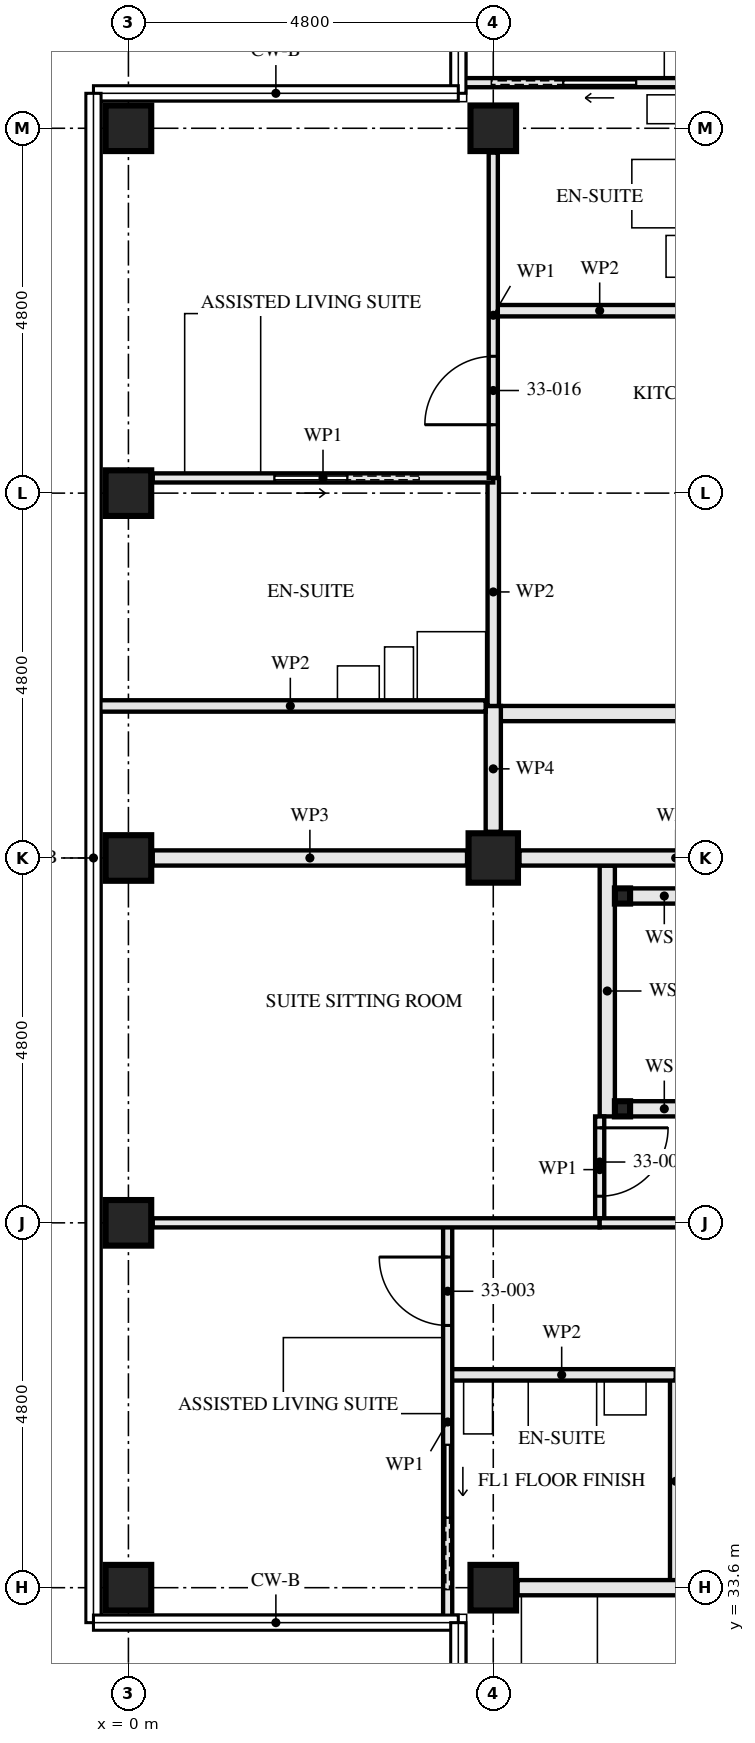
"""IFC4 building model, lengths in metres.
Left out: names, types, materials, properties, quantities, classifications, styles, units other than length and angle.
Written with IfcOpenShell. Run it as: python <this file> out.ifc"""

import sys

from ifc_helpers import new_model, si_unit, direction, frame, frame_2d, origin, origin_2d, place, context, subcontext, project, spatial, rectangle, hollow_rectangle, extrude, element, fill, save


model = new_model("IFC4")
c1 = context("Model", 3, precision=1e-05, world=origin(), true_north=direction((0.0, 1.0)))
c2 = subcontext(c1, "Body", "Model", "MODEL_VIEW")
j1 = project(units=[si_unit("LENGTHUNIT", "METRE"), si_unit("PLANEANGLEUNIT", "RADIAN")], contexts=[c1])
p1 = place(None, origin())
s1 = spatial("IfcSite", under=j1, at=p1, CompositionType="ELEMENT")
p2 = place(p1, origin())
s2 = spatial("IfcBuilding", under=s1, at=p2, CompositionType="ELEMENT")
p3 = place(p2, frame((0.0, 0.0, 122.5)))
s3 = spatial("IfcBuildingStorey", under=s2, at=p3, CompositionType="ELEMENT", Elevation=122.5)
for number, where, z_axis, x_axis in (
    (1, (0.0, 33.6, 0.0), (0.0, 0.0, 1.0), (0.0, 1.0, 0.0)),
    (2, (0.0, 38.4, 0.0), (0.0, 0.0, 1.0), (1.0, 0.0, 0.0)),
    (3, (0.0, 43.2, 0.0), (0.0, 0.0, 1.0), (0.0, 1.0, 0.0)),
    (4, (0.0, 48.0, 0.0), (0.0, 0.0, 1.0), (1.0, 0.0, 0.0)),
    (5, (0.0, 52.8, 0.0), (0.0, 0.0, 1.0), (0.0, 1.0, 0.0)),
    (6, (4.8, 33.6, 0.0), (0.0, 0.0, 1.0), (0.0, 1.0, 0.0)),
):
    element("IfcColumn", number, at=place(p3, frame(where, z_axis=z_axis, x_axis=x_axis)), inside=s3, PredefinedType="COLUMN", context=c2, shape_type="SweptSolid", body=[
        extrude(hollow_rectangle(XDim=0.6, YDim=0.6, WallThickness=0.08, at=origin_2d()), origin(), (0.0, 0.0, 1.0), 3.5),
    ])
p4 = place(p3, frame((4.8, 43.2, 0.0), z_axis=(0.0, 0.0, 1.0), x_axis=(0.0, 1.0, 0.0)))
e7 = element("IfcColumn", 7, at=p4, inside=s3, PredefinedType="COLUMN", context=c2, shape_type="SweptSolid", body=[
    extrude(hollow_rectangle(XDim=0.65, YDim=0.65, WallThickness=0.05, at=origin_2d()), origin(), (0.0, 0.0, 1.0), 3.5),
])
p5 = place(p3, frame((4.8, 52.8, 0.0), z_axis=(0.0, 0.0, 1.0), x_axis=(0.0, 1.0, 0.0)))
e8 = element("IfcColumn", 8, at=p5, inside=s3, PredefinedType="COLUMN", context=c2, shape_type="SweptSolid", body=[
    extrude(hollow_rectangle(XDim=0.6, YDim=0.6, WallThickness=0.08, at=origin_2d()), origin(), (0.0, 0.0, 1.0), 3.5),
])
for number, where, z_axis, x_axis in (
    (9, (6.5, 42.7, 0.0), (0.0, 0.0, 1.0), (1.0, 0.0, 0.0)),
    (10, (6.5, 39.9, 0.0), (0.0, 0.0, 1.0), (1.0, 0.0, 0.0)),
):
    element("IfcColumn", number, at=place(p3, frame(where, z_axis=z_axis, x_axis=x_axis)), inside=s3, PredefinedType="COLUMN", context=c2, shape_type="SweptSolid", body=[
        extrude(hollow_rectangle(XDim=0.2, YDim=0.2, WallThickness=0.008, at=origin_2d()), origin(), (0.0, 0.0, 1.0), 3.33),
    ])
for number, where, z_axis, x_axis in (
    (11, (6.6, 42.7, 0.0), (0.0, 0.0, 1.0), (1.0, 0.0, 0.0)),
    (12, (6.6, 39.9, 0.0), (0.0, 0.0, 1.0), (1.0, 0.0, 0.0)),
):
    element("IfcWall", number, at=place(p3, frame(where, z_axis=z_axis, x_axis=x_axis)), inside=s3, PredefinedType="SOLIDWALL", context=c2, shape_type="SweptSolid", body=[
        extrude(rectangle(XDim=0.9, YDim=0.2, at=frame_2d((0.45, 0.0))), origin(), (0.0, 0.0, 1.0), 2.99),
    ])
p6 = place(p3, frame((6.3, 43.1, 0.0), z_axis=(0.0, 0.0, 1.0), x_axis=(0.0, -1.0, 0.0)))
e13 = element("IfcWall", 13, at=p6, inside=s3, PredefinedType="SOLIDWALL", context=c2, shape_type="SweptSolid", body=[
    extrude(rectangle(XDim=3.3, YDim=0.2, at=frame_2d((1.65, 0.0))), origin(), (0.0, 0.0, 1.0), 3.33),
])
p7 = place(p3, frame((4.2, 36.4, 0.0), z_axis=(0.0, 0.0, 1.0), x_axis=(1.0, 0.0, 0.0)))
e14 = element("IfcWall", 14, at=p7, inside=s3, PredefinedType="PARTITIONING", context=c2, shape_type="SweptSolid", body=[
    extrude(rectangle(XDim=3.0, YDim=0.15, at=frame_2d((1.5, 0.0))), origin(), (0.0, 0.0, 1.0), 3.33),
])
p8 = place(p3, frame((7.2, 36.4, 0.0), z_axis=(0.0, 0.0, 1.0), x_axis=(0.0, -1.0, 0.0)))
e15 = element("IfcWall", 15, at=p8, inside=s3, PredefinedType="PARTITIONING", context=c2, shape_type="SweptSolid", body=[
    extrude(rectangle(XDim=2.8, YDim=0.15, at=frame_2d((1.4, 0.0))), origin(), (0.0, 0.0, 1.0), 3.33),
])
p9 = place(p3, frame((6.2, 38.4, 0.0), z_axis=(0.0, 0.0, 1.0), x_axis=(1.0, 0.0, 0.0)))
e16 = element("IfcWall", 16, at=p9, inside=s3, PredefinedType="PARTITIONING", context=c2, shape_type="SweptSolid", body=[
    extrude(rectangle(XDim=6.25, YDim=0.12, at=frame_2d((3.125, 0.0))), origin(), (0.0, 0.0, 1.0), 2.55),
])
p10 = place(p9, frame((2.675, 0.0, 0.0)))
e17 = element("IfcOpeningElement", 17, at=p10, cuts=e16, PredefinedType="OPENING", context=c2, shape_type="SweptSolid", body=[
    extrude(rectangle(XDim=0.9, YDim=2.1, at=frame_2d((0.45, 1.05))), frame((0.0, 0.071, 0.0), z_axis=(0.0, -1.0, 0.0), x_axis=(1.0, 0.0, 0.0)), (0.0, 0.0, 1.0), 0.141),
])
p11 = place(p3, frame((6.2, 39.8, 0.0), z_axis=(0.0, 0.0, 1.0), x_axis=(0.0, -1.0, 0.0)))
e18 = element("IfcWall", 18, at=p11, inside=s3, PredefinedType="PARTITIONING", context=c2, shape_type="SweptSolid", body=[
    extrude(rectangle(XDim=1.4, YDim=0.12, at=frame_2d((0.7, 0.0))), origin(), (0.0, 0.0, 1.0), 3.33),
])
p12 = place(p11, frame((0.15, 0.0, 0.0)))
e19 = element("IfcOpeningElement", 19, at=p12, cuts=e18, PredefinedType="OPENING", context=c2, shape_type="SweptSolid", body=[
    extrude(rectangle(XDim=0.9, YDim=2.1, at=frame_2d((0.45, 1.05))), frame((0.0, 0.071, 0.0), z_axis=(0.0, -1.0, 0.0), x_axis=(1.0, 0.0, 0.0)), (0.0, 0.0, 1.0), 0.141),
])
p13 = place(p3, frame((4.2, 38.4, 0.0), z_axis=(0.0, 0.0, 1.0), x_axis=(0.0, -1.0, 0.0)))
e20 = element("IfcWall", 20, at=p13, inside=s3, PredefinedType="PARTITIONING", context=c2, shape_type="SweptSolid", body=[
    extrude(rectangle(XDim=5.24, YDim=0.12, at=frame_2d((2.62, 0.0))), origin(), (0.0, 0.0, 1.0), 2.32),
])
p14 = place(p13, frame((0.45, 0.0, 0.0)))
e21 = element("IfcOpeningElement", 21, at=p14, cuts=e20, PredefinedType="OPENING", context=c2, shape_type="SweptSolid", body=[
    extrude(rectangle(XDim=0.9, YDim=2.1, at=frame_2d((0.45, 1.05))), frame((0.0, 0.071, 0.0), z_axis=(0.0, -1.0, 0.0), x_axis=(1.0, 0.0, 0.0)), (0.0, 0.0, 1.0), 0.141),
])
p15 = place(p13, frame((2.925, 0.0, 0.0)))
e22 = element("IfcOpeningElement", 22, at=p15, cuts=e20, PredefinedType="OPENING", context=c2, shape_type="SweptSolid", body=[
    extrude(rectangle(XDim=0.95, YDim=2.1, at=frame_2d((0.475, 1.05))), frame((0.0, 0.071, 0.0), z_axis=(0.0, -1.0, 0.0), x_axis=(1.0, 0.0, 0.0)), (0.0, 0.0, 1.0), 0.141),
])
p16 = place(p3, frame((0.32, 38.4, 0.0), z_axis=(0.0, 0.0, 1.0), x_axis=(1.0, 0.0, 0.0)))
e23 = element("IfcWall", 23, at=p16, inside=s3, PredefinedType="PARTITIONING", context=c2, shape_type="SweptSolid", body=[
    extrude(rectangle(XDim=5.88, YDim=0.12, at=frame_2d((2.94, 0.0))), origin(), (0.0, 0.0, 1.0), 2.55),
])
p17 = place(p3, frame((5.12, 33.6, 0.0), z_axis=(0.0, 0.0, 1.0), x_axis=(1.0, 0.0, 0.0)))
e24 = element("IfcWall", 24, at=p17, inside=s3, PredefinedType="PARTITIONING", context=c2, shape_type="SweptSolid", body=[
    extrude(rectangle(XDim=7.28, YDim=0.2, at=frame_2d((3.64, 0.0))), origin(), (0.0, 0.0, 1.0), 2.55),
])
p18 = place(p3, frame((7.6, 50.4, 0.0), z_axis=(0.0, 0.0, 1.0), x_axis=(-1.0, 0.0, 0.0)))
e25 = element("IfcWall", 25, at=p18, inside=s3, PredefinedType="PARTITIONING", context=c2, shape_type="SweptSolid", body=[
    extrude(rectangle(XDim=2.8, YDim=0.15, at=frame_2d((1.4, 0.0))), origin(), (0.0, 0.0, 1.0), 3.33),
])
p19 = place(p3, frame((4.8, 48.2, 0.0), z_axis=(0.0, 0.0, 1.0), x_axis=(0.0, -1.0, 0.0)))
e26 = element("IfcWall", 26, at=p19, inside=s3, PredefinedType="PARTITIONING", context=c2, shape_type="SweptSolid", body=[
    extrude(rectangle(XDim=3.0, YDim=0.15, at=frame_2d((1.5, 0.0))), origin(), (0.0, 0.0, 1.0), 2.55),
])
p20 = place(p3, frame((9.6, 53.4, 0.0), z_axis=(0.0, 0.0, 1.0), x_axis=(-1.0, 0.0, 0.0)))
e27 = element("IfcWall", 27, at=p20, inside=s3, PredefinedType="PARTITIONING", context=c2, shape_type="SweptSolid", body=[
    extrude(rectangle(XDim=5.24, YDim=0.12, at=frame_2d((2.62, 0.0))), origin(), (0.0, 0.0, 1.0), 2.32),
])
p21 = place(p20, frame((0.45, 0.0, 0.0)))
e28 = element("IfcOpeningElement", 28, at=p21, cuts=e27, PredefinedType="OPENING", context=c2, shape_type="SweptSolid", body=[
    extrude(rectangle(XDim=0.9, YDim=2.1, at=frame_2d((0.45, 1.05))), frame((0.0, 0.071, 0.0), z_axis=(0.0, -1.0, 0.0), x_axis=(1.0, 0.0, 0.0)), (0.0, 0.0, 1.0), 0.141),
])
p22 = place(p20, frame((2.925, 0.0, 0.0)))
e29 = element("IfcOpeningElement", 29, at=p22, cuts=e27, PredefinedType="OPENING", context=c2, shape_type="SweptSolid", body=[
    extrude(rectangle(XDim=0.95, YDim=2.1, at=frame_2d((0.475, 1.05))), frame((0.0, 0.071, 0.0), z_axis=(0.0, -1.0, 0.0), x_axis=(1.0, 0.0, 0.0)), (0.0, 0.0, 1.0), 0.141),
])
p23 = place(p3, frame((4.8, 48.2, 0.0), z_axis=(0.0, 0.0, 1.0), x_axis=(-1.0, 0.0, 0.0)))
e30 = element("IfcWall", 30, at=p23, inside=s3, PredefinedType="PARTITIONING", context=c2, shape_type="SweptSolid", body=[
    extrude(rectangle(XDim=4.48, YDim=0.12, at=frame_2d((2.24, 0.0))), origin(), (0.0, 0.0, 1.0), 3.33),
])
p24 = place(p23, frame((1.925, 0.0, 0.0)))
e31 = element("IfcOpeningElement", 31, at=p24, cuts=e30, PredefinedType="OPENING", context=c2, shape_type="SweptSolid", body=[
    extrude(rectangle(XDim=0.95, YDim=2.1, at=frame_2d((0.475, 1.05))), frame((0.0, 0.071, 0.0), z_axis=(0.0, -1.0, 0.0), x_axis=(1.0, 0.0, 0.0)), (0.0, 0.0, 1.0), 0.141),
])
p25 = place(p3, frame((4.8, 52.48, 0.0), z_axis=(0.0, 0.0, 1.0), x_axis=(0.0, -1.0, 0.0)))
e32 = element("IfcWall", 32, at=p25, inside=s3, PredefinedType="PARTITIONING", context=c2, shape_type="SweptSolid", body=[
    extrude(rectangle(XDim=4.28, YDim=0.12, at=frame_2d((2.14, 0.0))), origin(), (0.0, 0.0, 1.0), 3.33),
])
p26 = place(p25, frame((2.68, 0.0, 0.0)))
e33 = element("IfcOpeningElement", 33, at=p26, cuts=e32, PredefinedType="OPENING", context=c2, shape_type="SweptSolid", body=[
    extrude(rectangle(XDim=0.9, YDim=2.1, at=frame_2d((0.45, 1.05))), frame((0.0, 0.071, 0.0), z_axis=(0.0, -1.0, 0.0), x_axis=(1.0, 0.0, 0.0)), (0.0, 0.0, 1.0), 0.141),
])
p27 = place(p3, frame((14.4, 45.1, 0.0), z_axis=(0.0, 0.0, 1.0), x_axis=(-1.0, 0.0, 0.0)))
e34 = element("IfcWall", 34, at=p27, inside=s3, PredefinedType="PARTITIONING", context=c2, shape_type="SweptSolid", body=[
    extrude(rectangle(XDim=9.6, YDim=0.2, at=frame_2d((4.8, 0.0))), origin(), (0.0, 0.0, 1.0), 3.33),
])
p28 = place(p27, frame((0.4, 0.0, 0.0)))
e35 = element("IfcOpeningElement", 35, at=p28, cuts=e34, PredefinedType="OPENING", context=c2, shape_type="SweptSolid", body=[
    extrude(rectangle(XDim=1.0, YDim=2.1, at=frame_2d((0.5, 1.05))), frame((0.0, 0.111, 0.0), z_axis=(0.0, -1.0, 0.0), x_axis=(1.0, 0.0, 0.0)), (0.0, 0.0, 1.0), 0.221),
])
p29 = place(p27, frame((5.2, 0.0, 0.0)))
e36 = element("IfcOpeningElement", 36, at=p29, cuts=e34, PredefinedType="OPENING", context=c2, shape_type="SweptSolid", body=[
    extrude(rectangle(XDim=1.0, YDim=2.1, at=frame_2d((0.5, 1.05))), frame((0.0, 0.111, 0.0), z_axis=(0.0, -1.0, 0.0), x_axis=(1.0, 0.0, 0.0)), (0.0, 0.0, 1.0), 0.221),
])
p30 = place(p3, frame((4.8, 45.2, 0.0), z_axis=(0.0, 0.0, 1.0), x_axis=(0.0, -1.0, 0.0)))
e37 = element("IfcWall", 37, at=p30, inside=s3, PredefinedType="PARTITIONING", context=c2, shape_type="SweptSolid", body=[
    extrude(rectangle(XDim=1.655, YDim=0.2, at=frame_2d((0.828, 0.0))), origin(), (0.0, 0.0, 1.0), 3.33),
])
p31 = place(p3, frame((9.255, 43.2, 0.0), z_axis=(0.0, 0.0, 1.0), x_axis=(-1.0, 0.0, 0.0)))
e38 = element("IfcWall", 38, at=p31, inside=s3, PredefinedType="PARTITIONING", context=c2, shape_type="SweptSolid", body=[
    extrude(rectangle(XDim=4.11, YDim=0.2, at=frame_2d((2.055, 0.0))), origin(), (0.0, 0.0, 1.0), 2.32),
])
p32 = place(p3, frame((4.455, 43.2, 0.0), z_axis=(0.0, 0.0, 1.0), x_axis=(-1.0, 0.0, 0.0)))
e39 = element("IfcWall", 39, at=p32, inside=s3, PredefinedType="PARTITIONING", context=c2, shape_type="SweptSolid", body=[
    extrude(rectangle(XDim=4.135, YDim=0.2, at=frame_2d((2.067, 0.0))), origin(), (0.0, 0.0, 1.0), 2.32),
])
p33 = place(p3, frame((4.7, 45.2, 0.0), z_axis=(0.0, 0.0, 1.0), x_axis=(-1.0, 0.0, 0.0)))
e40 = element("IfcWall", 40, at=p33, inside=s3, PredefinedType="PARTITIONING", context=c2, shape_type="SweptSolid", body=[
    extrude(rectangle(XDim=5.14, YDim=0.15, at=frame_2d((2.57, 0.0))), origin(), (0.0, 0.0, 1.0), 2.32),
])
p34 = place(p12, origin())
e41 = element("IfcDoor", 41, at=p34, inside=s3, OperationType="SINGLE_SWING_RIGHT", PredefinedType="DOOR", context=c2, shape_type="SweptSolid", body=[
    extrude(rectangle(XDim=0.9, YDim=2.1, at=frame_2d((0.45, 1.05))), frame((0.0, 0.022, 0.0), z_axis=(0.0, -1.0, 0.0), x_axis=(1.0, 0.0, 0.0)), (0.0, 0.0, 1.0), 0.044),
])
fill(e19, e41)
p35 = place(p14, frame((0.9, 0.0, 0.0), z_axis=(0.0, 0.0, 1.0), x_axis=(-1.0, 0.0, 0.0)))
e42 = element("IfcDoor", 42, at=p35, inside=s3, OperationType="SINGLE_SWING_LEFT", PredefinedType="DOOR", context=c2, shape_type="SweptSolid", body=[
    extrude(rectangle(XDim=0.9, YDim=2.1, at=frame_2d((0.45, 1.05))), frame((0.0, 0.022, 0.0), z_axis=(0.0, -1.0, 0.0), x_axis=(1.0, 0.0, 0.0)), (0.0, 0.0, 1.0), 0.044),
])
fill(e21, e42)
p36 = place(p15, origin())
e43 = element("IfcDoor", 43, at=p36, inside=s3, OperationType="SLIDING_TO_LEFT", PredefinedType="DOOR", context=c2, shape_type="SweptSolid", body=[
    extrude(rectangle(XDim=0.95, YDim=2.1, at=frame_2d((0.475, 1.05))), frame((0.0, 0.022, 0.0), z_axis=(0.0, -1.0, 0.0), x_axis=(1.0, 0.0, 0.0)), (0.0, 0.0, 1.0), 0.044),
])
fill(e22, e43)
p37 = place(p22, origin())
e44 = element("IfcDoor", 44, at=p37, inside=s3, OperationType="SLIDING_TO_LEFT", PredefinedType="DOOR", context=c2, shape_type="SweptSolid", body=[
    extrude(rectangle(XDim=0.95, YDim=2.1, at=frame_2d((0.475, 1.05))), frame((0.0, 0.022, 0.0), z_axis=(0.0, -1.0, 0.0), x_axis=(1.0, 0.0, 0.0)), (0.0, 0.0, 1.0), 0.044),
])
fill(e29, e44)
p38 = place(p24, origin())
e45 = element("IfcDoor", 45, at=p38, inside=s3, OperationType="SLIDING_TO_RIGHT", PredefinedType="DOOR", context=c2, shape_type="SweptSolid", body=[
    extrude(rectangle(XDim=0.95, YDim=2.1, at=frame_2d((0.475, 1.05))), frame((0.0, 0.022, 0.0), z_axis=(0.0, -1.0, 0.0), x_axis=(1.0, 0.0, 0.0)), (0.0, 0.0, 1.0), 0.044),
])
fill(e31, e45)
p39 = place(p26, frame((0.9, 0.0, 0.0), z_axis=(0.0, 0.0, 1.0), x_axis=(-1.0, 0.0, 0.0)))
e46 = element("IfcDoor", 46, at=p39, inside=s3, OperationType="SINGLE_SWING_RIGHT", PredefinedType="DOOR", context=c2, shape_type="SweptSolid", body=[
    extrude(rectangle(XDim=0.9, YDim=2.1, at=frame_2d((0.45, 1.05))), frame((0.0, 0.022, 0.0), z_axis=(0.0, -1.0, 0.0), x_axis=(1.0, 0.0, 0.0)), (0.0, 0.0, 1.0), 0.044),
])
fill(e33, e46)
save(model, sys.argv[1])
